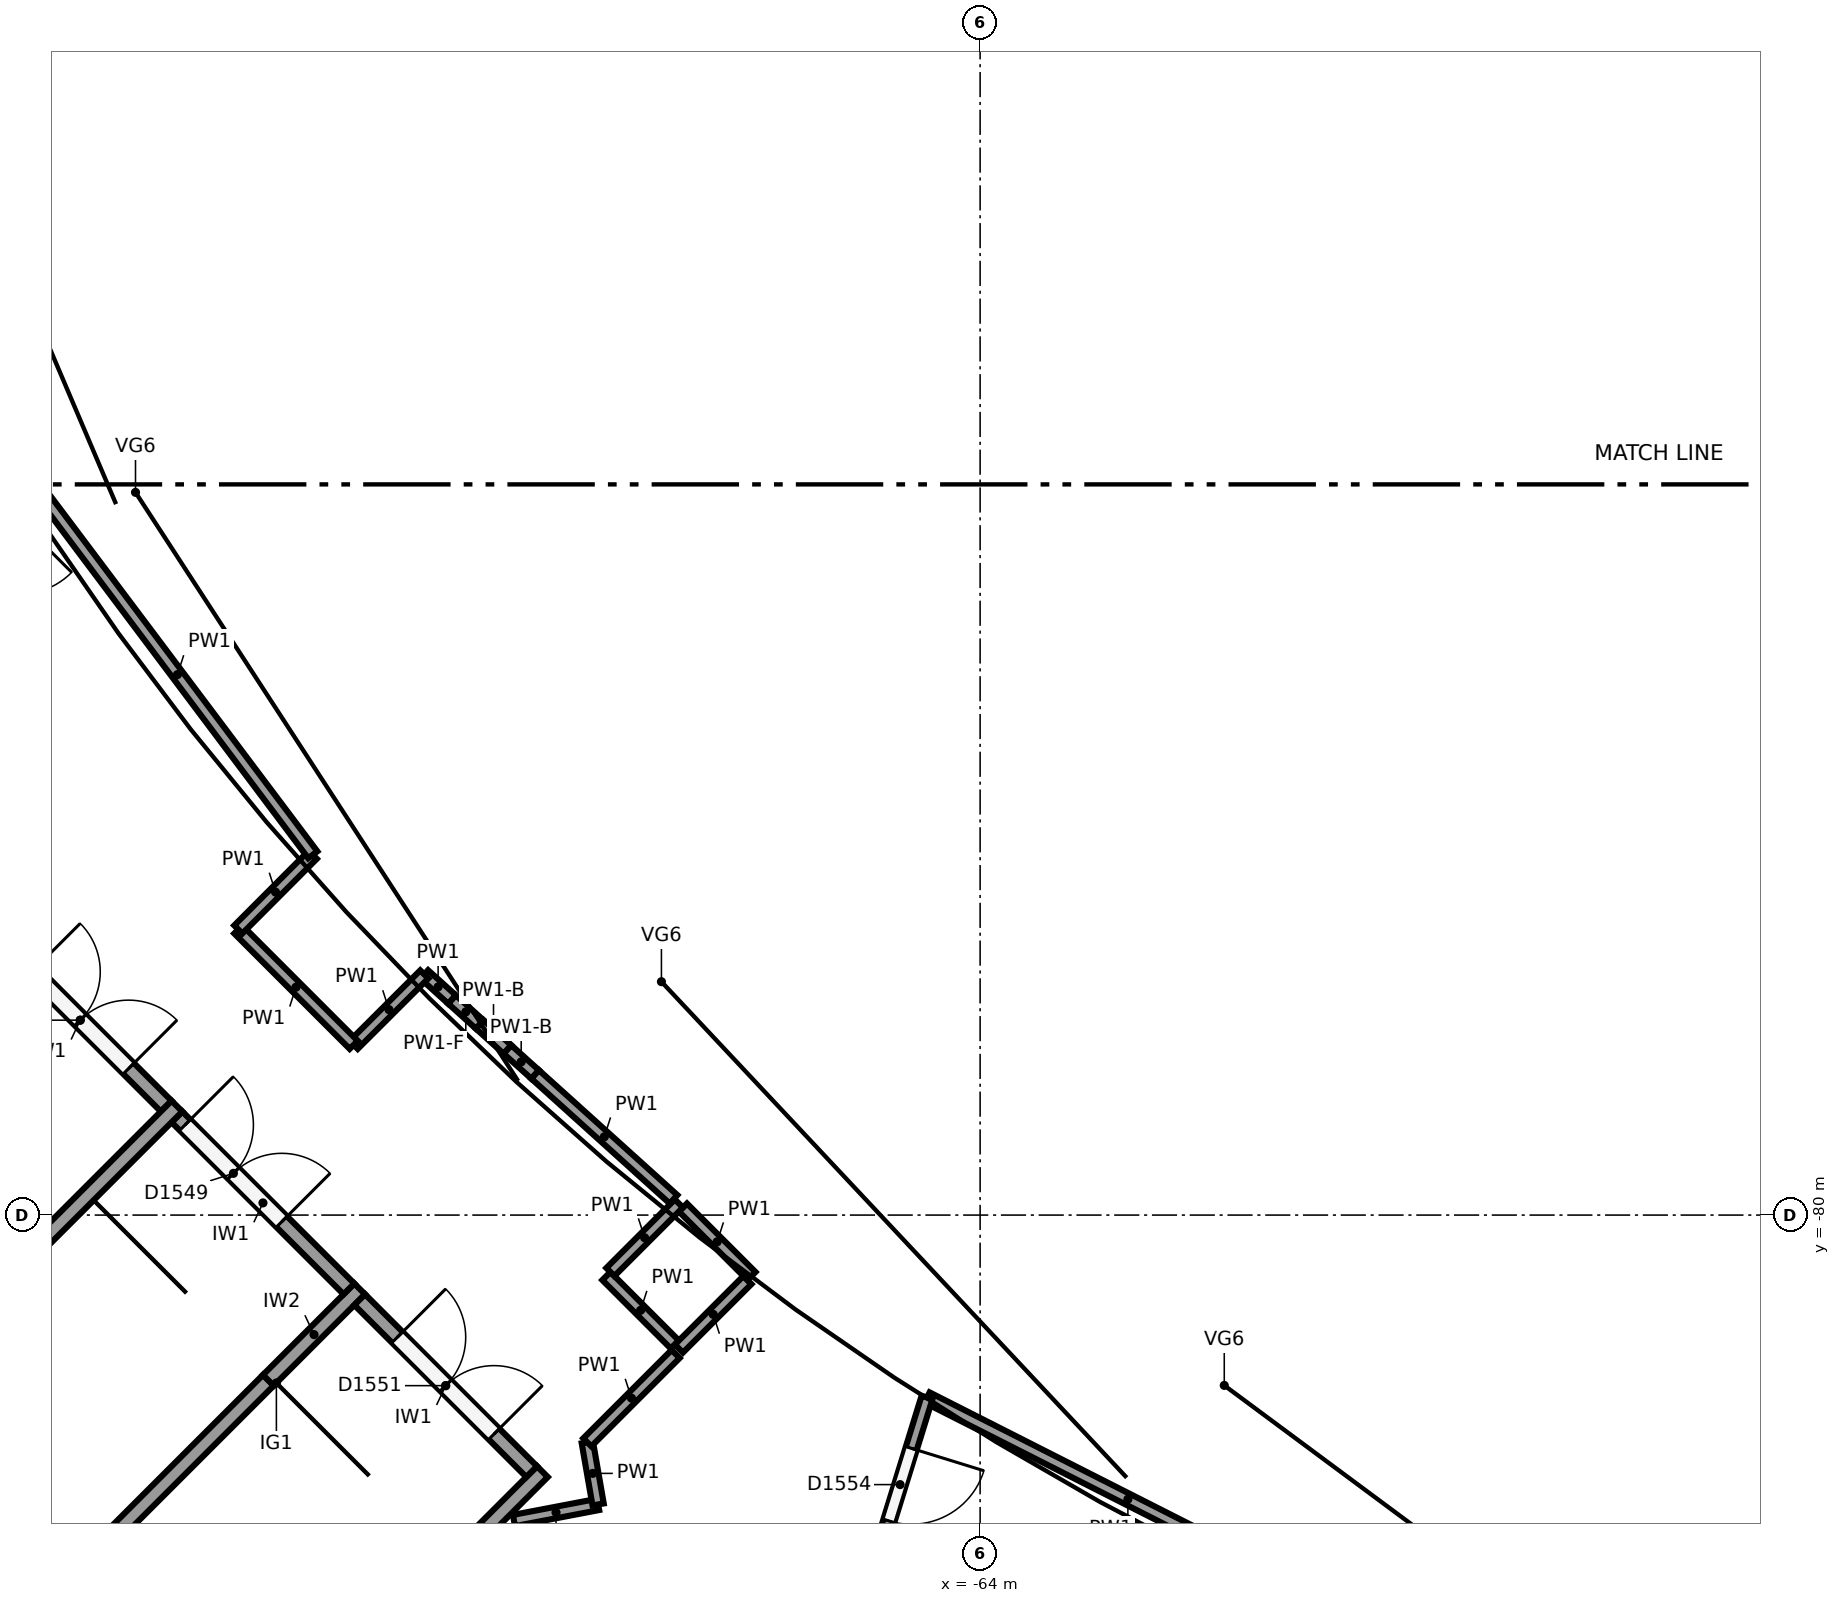
"""IFC4 building model, lengths in metres.
Left out: names, types, materials, properties, quantities, classifications, styles, units other than length and angle.
Written with IfcOpenShell. Run it as: python <this file> out.ifc"""

import sys

from ifc_helpers import new_model, si_unit, direction, frame, frame_2d, origin, origin_2d, place, context, subcontext, project, spatial, rectangle, circle, extrude, element, fill, save


model = new_model("IFC4")
c1 = context("Model", 3, precision=1e-05, world=origin(), true_north=direction((0.0, 1.0)))
c2 = subcontext(c1, "Body", "Model", "MODEL_VIEW")
j1 = project(units=[si_unit("LENGTHUNIT", "METRE"), si_unit("PLANEANGLEUNIT", "RADIAN")], contexts=[c1])
p1 = place(None, origin())
s1 = spatial("IfcSite", under=j1, at=p1, CompositionType="ELEMENT")
p2 = place(p1, origin())
s2 = spatial("IfcBuilding", under=s1, at=p2, CompositionType="ELEMENT")
p3 = place(p2, frame((0.0, 0.0, 24.0)))
s3 = spatial("IfcBuildingStorey", under=s2, at=p3, CompositionType="ELEMENT", Elevation=24.0)
p4 = place(p3, frame((-71.775, -79.889, 0.0), z_axis=(0.0, 0.0, 1.0), x_axis=(1.0, 0.0, 0.0)))
e1 = element("IfcColumn", 1, at=p4, inside=s3, PredefinedType="COLUMN", context=c2, shape_type="SweptSolid", body=[
    extrude(circle(Radius=0.6, at=origin_2d()), origin(), (0.0, 0.0, 1.0), 6.0),
])
for number, where, z_axis, x_axis in (
    (2, (-81.497, -85.497, 0.0), (0.0, 0.0, 1.0), (0.707, 0.707, 0.0)),
    (3, (-76.688, -90.305, 0.0), (0.0, 0.0, 1.0), (0.707, 0.707, 0.0)),
):
    element("IfcWall", number, at=place(p3, frame(where, z_axis=z_axis, x_axis=x_axis)), inside=s3, PredefinedType="SHEAR", context=c2, shape_type="SweptSolid", body=[
        extrude(rectangle(XDim=9.8, YDim=0.2, at=frame_2d((4.9, 0.0))), origin(), (0.0, 0.0, 1.0), 5.75),
    ])
p5 = place(p3, frame((-79.093, -87.901, 0.0), z_axis=(0.0, 0.0, 1.0), x_axis=(0.707106781187, 0.707106781187, 0.0)))
e4 = element("IfcWall", 4, at=p5, inside=s3, PredefinedType="SHEAR", context=c2, shape_type="SweptSolid", body=[
    extrude(rectangle(XDim=8.1, YDim=0.2, at=frame_2d((4.05, 0.0))), origin(), (0.0, 0.0, 1.0), 5.75),
])
p6 = place(p3, frame((-73.365, -82.173, 0.0), z_axis=(0.0, 0.0, 1.0), x_axis=(0.707034968179, 0.707178586901, 0.0)))
e5 = element("IfcWall", 5, at=p6, inside=s3, PredefinedType="SHEAR", context=c2, shape_type="SweptSolid", body=[
    extrude(rectangle(XDim=1.7, YDim=0.2, at=frame_2d((0.85, 0.0))), origin(), (0.0, 0.0, 1.0), 5.75),
])
p7 = place(p3, frame((-76.971, -76.304, 0.0), z_axis=(0.0, 0.0, 1.0), x_axis=(0.707106781187, -0.707106781187, 0.0)))
e6 = element("IfcWall", 6, at=p7, inside=s3, PredefinedType="SHEAR", context=c2, shape_type="SweptSolid", body=[
    extrude(rectangle(XDim=3.2, YDim=0.2, at=frame_2d((1.6, 0.0))), origin(), (0.0, 0.0, 1.0), 5.75),
])
p8 = place(p7, frame((0.7, 0.0, 0.0)))
e7 = element("IfcOpeningElement", 7, at=p8, cuts=e6, PredefinedType="OPENING", context=c2, shape_type="SweptSolid", body=[
    extrude(rectangle(XDim=1.8, YDim=2.1, at=frame_2d((0.9, 1.05))), frame((0.0, 0.11, 0.0), z_axis=(0.0, -1.0, 0.0), x_axis=(1.0, 0.0, 0.0)), (0.0, 0.0, 1.0), 0.22),
])
p9 = place(p3, frame((-74.567, -78.708, 0.0), z_axis=(0.0, 0.0, 1.0), x_axis=(0.707106781187, -0.707106781187, 0.0)))
e8 = element("IfcWall", 8, at=p9, inside=s3, PredefinedType="SHEAR", context=c2, shape_type="SweptSolid", body=[
    extrude(rectangle(XDim=3.2, YDim=0.2, at=frame_2d((1.6, 0.0))), origin(), (0.0, 0.0, 1.0), 5.75),
])
p10 = place(p9, frame((0.15, 0.0, 0.0)))
e9 = element("IfcOpeningElement", 9, at=p10, cuts=e8, PredefinedType="OPENING", context=c2, shape_type="SweptSolid", body=[
    extrude(rectangle(XDim=1.8, YDim=2.1, at=frame_2d((0.9, 1.05))), frame((0.0, 0.11, 0.0), z_axis=(0.0, -1.0, 0.0), x_axis=(1.0, 0.0, 0.0)), (0.0, 0.0, 1.0), 0.22),
])
p11 = place(p3, frame((-72.163, -81.113, 0.0), z_axis=(0.0, 0.0, 1.0), x_axis=(0.707144925854, -0.707068634461, 0.0)))
e10 = element("IfcWall", 10, at=p11, inside=s3, PredefinedType="SHEAR", context=c2, shape_type="SweptSolid", body=[
    extrude(rectangle(XDim=3.2, YDim=0.2, at=frame_2d((1.6, 0.0))), origin(), (0.0, 0.0, 1.0), 5.75),
])
p12 = place(p11, frame((0.7, 0.0, 0.0)))
e11 = element("IfcOpeningElement", 11, at=p12, cuts=e10, PredefinedType="OPENING", context=c2, shape_type="SweptSolid", body=[
    extrude(rectangle(XDim=1.8, YDim=2.1, at=frame_2d((0.9, 1.05))), frame((0.0, 0.11, 0.0), z_axis=(0.0, -1.0, 0.0), x_axis=(1.0, 0.0, 0.0)), (0.0, 0.0, 1.0), 0.22),
])
for number, where, z_axis, x_axis in (
    (12, (-68.918, -80.802, 0.0), (0.0, 0.0, 1.0), (0.707, -0.707, 0.0)),
    (13, (-67.963, -81.757, 0.0), (0.0, 0.0, 1.0), (0.707, 0.707, 0.0)),
    (14, (-67.009, -80.802, 0.0), (0.0, 0.0, 1.0), (-0.707, 0.707, 0.0)),
):
    element("IfcWall", number, at=place(p3, frame(where, z_axis=z_axis, x_axis=x_axis)), inside=s3, PredefinedType="PARTITIONING", context=c2, shape_type="SweptSolid", body=[
        extrude(rectangle(XDim=1.275, YDim=0.15, at=frame_2d((0.638, 0.0))), origin(), (0.0, 0.0, 1.0), 5.4),
    ])
p13 = place(p3, frame((-67.963, -79.847, 0.0), z_axis=(0.0, 0.0, 1.0), x_axis=(-0.707202523759, -0.707011025648, 0.0)))
e15 = element("IfcWall", 15, at=p13, inside=s3, PredefinedType="PARTITIONING", context=c2, shape_type="SweptSolid", body=[
    extrude(rectangle(XDim=1.275, YDim=0.15, at=frame_2d((0.637, 0.0))), origin(), (0.0, 0.0, 1.0), 5.4),
])
p14 = place(p3, frame((-70.134, -84.018, 0.0), z_axis=(0.0, 0.0, 1.0), x_axis=(0.982266484486, 0.187490142289, 0.0)))
e16 = element("IfcWall", 16, at=p14, inside=s3, PredefinedType="PARTITIONING", context=c2, shape_type="SweptSolid", body=[
    extrude(rectangle(XDim=1.128, YDim=0.15, at=frame_2d((0.564, 0.0))), origin(), (0.0, 0.0, 1.0), 5.4),
])
p15 = place(p3, frame((-69.026, -83.807, 0.0), z_axis=(0.0, 0.0, 1.0), x_axis=(-0.171316329805, 0.985216075357, 0.0)))
e17 = element("IfcWall", 17, at=p15, inside=s3, PredefinedType="PARTITIONING", context=c2, shape_type="SweptSolid", body=[
    extrude(rectangle(XDim=0.829, YDim=0.15, at=frame_2d((0.415, 0.0))), origin(), (0.0, 0.0, 1.0), 5.4),
])
p16 = place(p3, frame((-69.168, -82.99, 0.0), z_axis=(0.0, 0.0, 1.0), x_axis=(0.707106781187, 0.707106781187, 0.0)))
e18 = element("IfcWall", 18, at=p16, inside=s3, PredefinedType="PARTITIONING", context=c2, shape_type="SweptSolid", body=[
    extrude(rectangle(XDim=1.643, YDim=0.15, at=frame_2d((0.822, 0.0))), origin(), (0.0, 0.0, 1.0), 5.4),
])
p17 = place(p3, frame((-68.034, -79.792, 0.0), z_axis=(0.0, 0.0, 1.0), x_axis=(-0.742586219179, 0.669750481213, 0.0)))
e19 = element("IfcWall", 19, at=p17, inside=s3, PredefinedType="PARTITIONING", context=c2, shape_type="SweptSolid", body=[
    extrude(rectangle(XDim=2.454, YDim=0.15, at=frame_2d((1.227, 0.0))), origin(), (0.0, 0.0, 1.0), 5.4),
])
p18 = place(p3, frame((-69.856, -78.149, 0.0), z_axis=(0.0, 0.0, 1.0), x_axis=(-0.742477572111, 0.669870924068, 0.0)))
e20 = element("IfcWall", 20, at=p18, inside=s3, PredefinedType="PARTITIONING", context=c2, shape_type="SweptSolid", body=[
    extrude(rectangle(XDim=0.491, YDim=0.15, at=frame_2d((0.246, 0.0))), origin(), (0.0, 0.0, 1.0), 2.379),
])
p19 = place(p3, frame((-70.22, -77.82, 0.0), z_axis=(0.0, 0.0, 1.0), x_axis=(-0.742724945946, 0.669596635796, 0.0)))
e21 = element("IfcWall", 21, at=p19, inside=s3, PredefinedType="PARTITIONING", context=c2, shape_type="SweptSolid", body=[
    extrude(rectangle(XDim=0.491, YDim=0.15, at=frame_2d((0.245, 0.0))), origin(), (0.0, 0.0, 1.0), 2.379),
])
p20 = place(p3, frame((-70.585, -77.491, 0.0), z_axis=(0.0, 0.0, 1.0), x_axis=(-0.742254293896, 0.670118320293, 0.0)))
e22 = element("IfcWall", 22, at=p20, inside=s3, PredefinedType="PARTITIONING", context=c2, shape_type="SweptSolid", body=[
    extrude(rectangle(XDim=0.491, YDim=0.15, at=frame_2d((0.245, 0.0))), origin(), (0.0, 0.0, 1.0), 2.474),
])
p21 = place(p3, frame((-70.949, -77.162, 0.0), z_axis=(0.0, 0.0, 1.0), x_axis=(-0.742724945946, 0.669596635796, 0.0)))
e23 = element("IfcWall", 23, at=p21, inside=s3, PredefinedType="PARTITIONING", context=c2, shape_type="SweptSolid", body=[
    extrude(rectangle(XDim=0.491, YDim=0.15, at=frame_2d((0.245, 0.0))), origin(), (0.0, 0.0, 1.0), 5.4),
])
p22 = place(p3, frame((-71.313, -76.834, 0.0), z_axis=(0.0, 0.0, 1.0), x_axis=(-0.707664949678, -0.706548171746, 0.0)))
e24 = element("IfcWall", 24, at=p22, inside=s3, PredefinedType="PARTITIONING", context=c2, shape_type="SweptSolid", body=[
    extrude(rectangle(XDim=1.312, YDim=0.15, at=frame_2d((0.656, 0.0))), origin(), (0.0, 0.0, 1.0), 5.4),
])
p23 = place(p3, frame((-72.242, -77.76, 0.0), z_axis=(0.0, 0.0, 1.0), x_axis=(-0.707163624852, 0.707049932951, 0.0)))
e25 = element("IfcWall", 25, at=p23, inside=s3, PredefinedType="PARTITIONING", context=c2, shape_type="SweptSolid", body=[
    extrude(rectangle(XDim=2.147, YDim=0.15, at=frame_2d((1.074, 0.0))), origin(), (0.0, 0.0, 1.0), 5.4),
])
p24 = place(p3, frame((-73.76, -76.242, 0.0), z_axis=(0.0, 0.0, 1.0), x_axis=(0.706226529773, 0.707985938168, 0.0)))
e26 = element("IfcWall", 26, at=p24, inside=s3, PredefinedType="PARTITIONING", context=c2, shape_type="SweptSolid", body=[
    extrude(rectangle(XDim=1.388, YDim=0.15, at=frame_2d((0.694, 0.0))), origin(), (0.0, 0.0, 1.0), 5.4),
])
p25 = place(p3, frame((-72.78, -75.26, 0.0), z_axis=(0.0, 0.0, 1.0), x_axis=(-0.600540118693, 0.799594625945, 0.0)))
e27 = element("IfcWall", 27, at=p25, inside=s3, PredefinedType="PARTITIONING", context=c2, shape_type="SweptSolid", body=[
    extrude(rectangle(XDim=5.929, YDim=0.15, at=frame_2d((2.964, 0.0))), origin(), (0.0, 0.0, 1.0), 5.4),
])
p26 = place(p3, frame((-59.413, -85.078, 0.0), z_axis=(0.0, 0.0, 1.0), x_axis=(-0.891999670452, 0.45203604714, 0.0)))
e28 = element("IfcWall", 28, at=p26, inside=s3, PredefinedType="PARTITIONING", context=c2, shape_type="SweptSolid", body=[
    extrude(rectangle(XDim=5.925, YDim=0.15, at=frame_2d((2.963, 0.0))), origin(), (0.0, 0.0, 1.0), 5.4),
])
p27 = place(p3, frame((-64.698, -82.399, 0.0), z_axis=(0.0, 0.0, 1.0), x_axis=(-0.295354963717, -0.955387589101, 0.0)))
e29 = element("IfcWall", 29, at=p27, inside=s3, PredefinedType="PARTITIONING", context=c2, shape_type="SweptSolid", body=[
    extrude(rectangle(XDim=4.244, YDim=0.15, at=frame_2d((2.122, 0.0))), origin(), (0.0, 0.0, 1.0), 5.4),
])
p28 = place(p27, frame((0.7, 0.0, 0.0)))
e30 = element("IfcOpeningElement", 30, at=p28, cuts=e29, PredefinedType="OPENING", context=c2, shape_type="SweptSolid", body=[
    extrude(rectangle(XDim=1.0, YDim=2.1, at=frame_2d((0.5, 1.05))), frame((0.0, 0.085, 0.0), z_axis=(0.0, -1.0, 0.0), x_axis=(1.0, 0.0, 0.0)), (0.0, 0.0, 1.0), 0.17),
])
p29 = place(p8, origin())
e31 = element("IfcDoor", 31, at=p29, inside=s3, OperationType="DOUBLE_DOOR_SINGLE_SWING", PredefinedType="DOOR", context=c2, shape_type="SweptSolid", body=[
    extrude(rectangle(XDim=1.8, YDim=2.1, at=frame_2d((0.9, 1.05))), frame((0.0, 0.025, 0.0), z_axis=(0.0, -1.0, 0.0), x_axis=(1.0, 0.0, 0.0)), (0.0, 0.0, 1.0), 0.05),
])
fill(e7, e31)
p30 = place(p10, origin())
e32 = element("IfcDoor", 32, at=p30, inside=s3, OperationType="DOUBLE_DOOR_SINGLE_SWING", PredefinedType="DOOR", context=c2, shape_type="SweptSolid", body=[
    extrude(rectangle(XDim=1.8, YDim=2.1, at=frame_2d((0.9, 1.05))), frame((0.0, 0.025, 0.0), z_axis=(0.0, -1.0, 0.0), x_axis=(1.0, 0.0, 0.0)), (0.0, 0.0, 1.0), 0.05),
])
fill(e9, e32)
p31 = place(p12, origin())
e33 = element("IfcDoor", 33, at=p31, inside=s3, OperationType="DOUBLE_DOOR_SINGLE_SWING", PredefinedType="DOOR", context=c2, shape_type="SweptSolid", body=[
    extrude(rectangle(XDim=1.8, YDim=2.1, at=frame_2d((0.9, 1.05))), frame((0.0, 0.025, 0.0), z_axis=(0.0, -1.0, 0.0), x_axis=(1.0, 0.0, 0.0)), (0.0, 0.0, 1.0), 0.05),
])
fill(e11, e33)
p32 = place(p28, origin())
e34 = element("IfcDoor", 34, at=p32, inside=s3, OperationType="SINGLE_SWING_LEFT", PredefinedType="DOOR", context=c2, shape_type="SweptSolid", body=[
    extrude(rectangle(XDim=1.0, YDim=2.1, at=frame_2d((0.5, 1.05))), frame((0.0, 0.025, 0.0), z_axis=(0.0, -1.0, 0.0), x_axis=(1.0, 0.0, 0.0)), (0.0, 0.0, 1.0), 0.05),
])
fill(e30, e34)
save(model, sys.argv[1])
